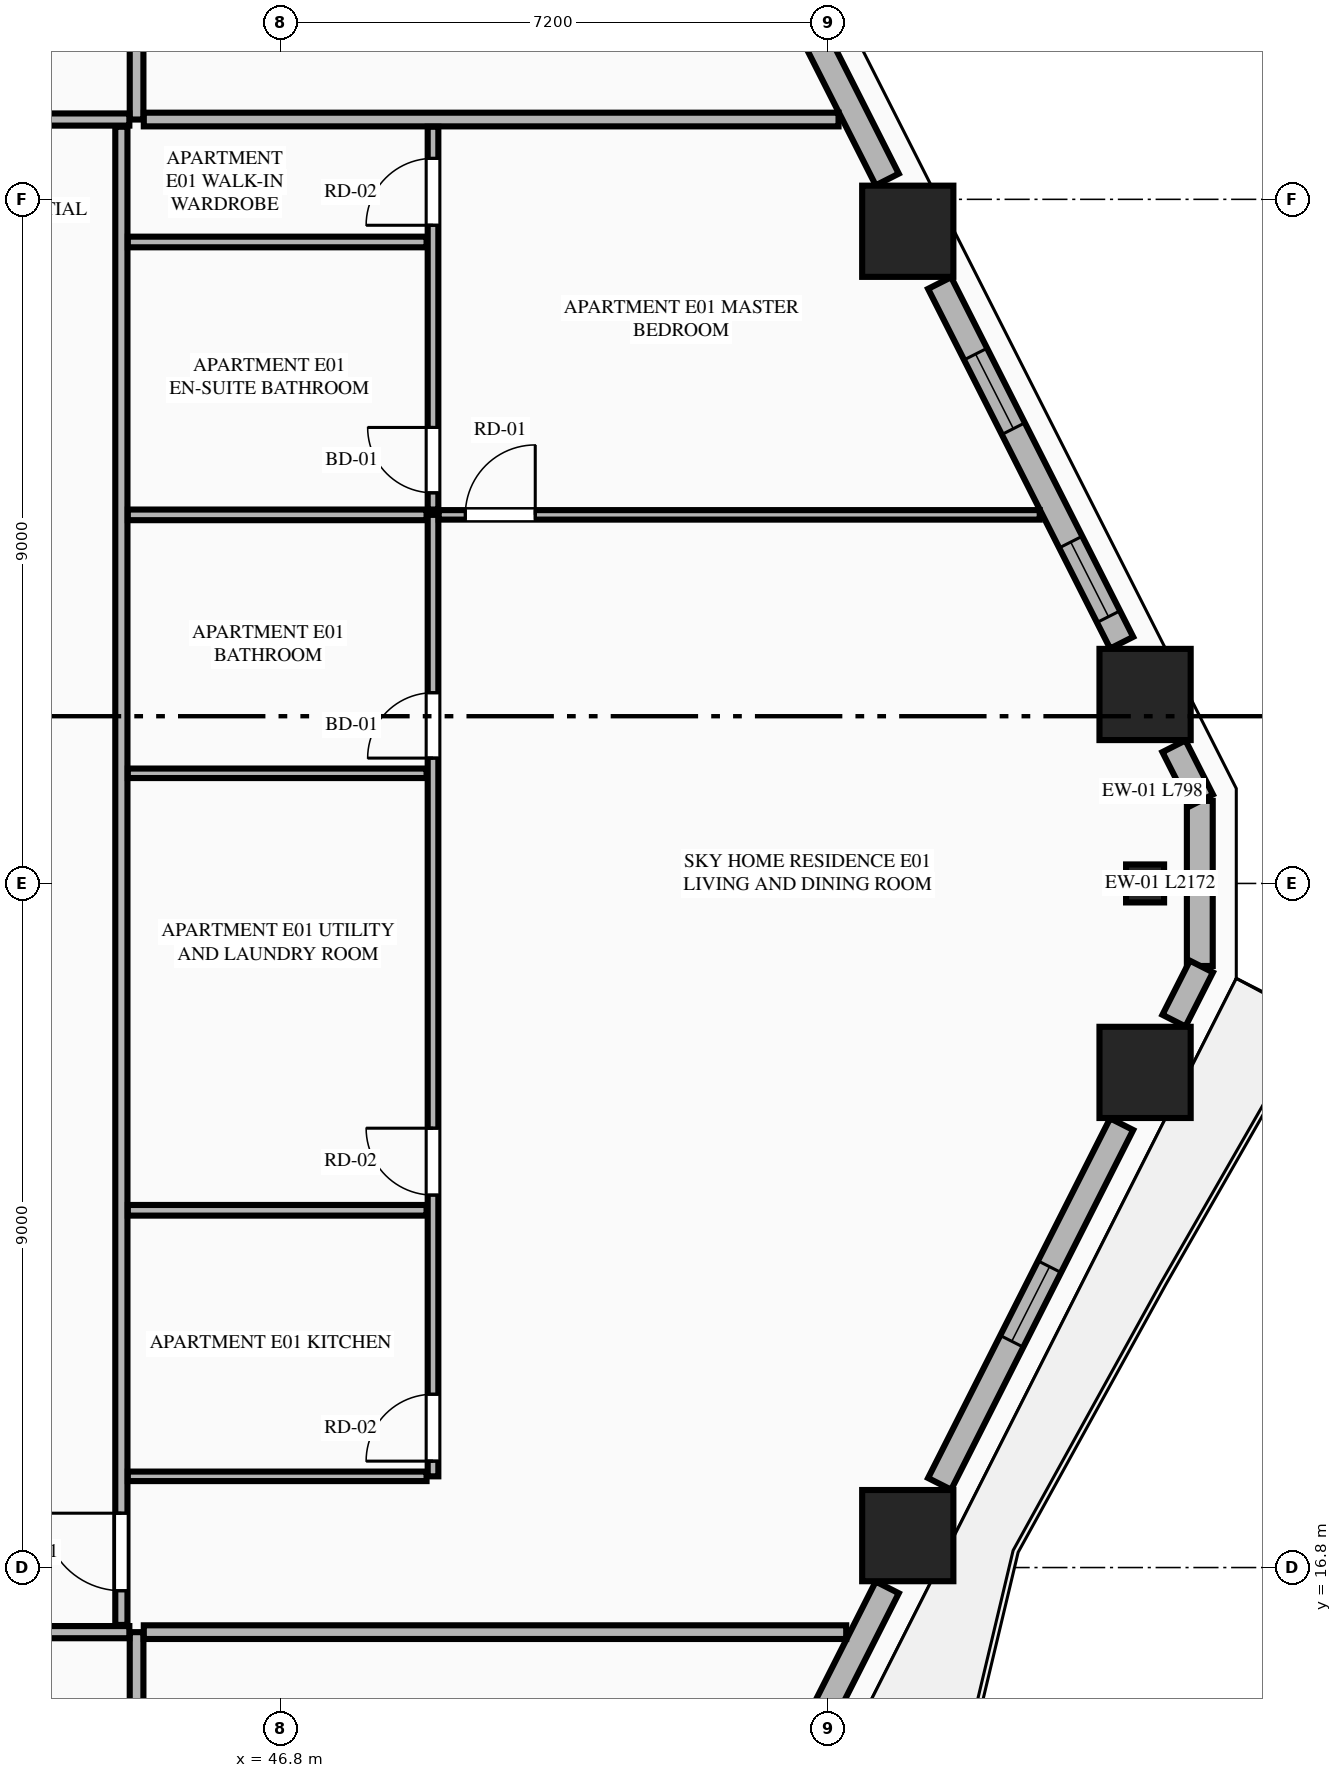
"""IFC4 building model, lengths in metres.
Left out: names, types, materials, properties, quantities, classifications, styles, units other than length and angle.
Written with IfcOpenShell. Run it as: python <this file> out.ifc"""

import sys

from ifc_helpers import new_model, si_unit, direction, frame, frame_2d, origin, origin_2d, place, context, subcontext, project, spatial, rectangle, extrude, element, fill, save


model = new_model("IFC4")
c1 = context("Model", 3, precision=1e-05, world=origin(), true_north=direction((0.0, 1.0)))
c2 = subcontext(c1, "Body", "Model", "MODEL_VIEW")
j1 = project(units=[si_unit("LENGTHUNIT", "METRE"), si_unit("PLANEANGLEUNIT", "RADIAN")], contexts=[c1])
p1 = place(None, origin())
s1 = spatial("IfcSite", under=j1, at=p1, CompositionType="ELEMENT")
p2 = place(p1, origin())
s2 = spatial("IfcBuilding", under=s1, at=p2, CompositionType="ELEMENT")
p3 = place(p2, frame((0.0, 0.0, 53.3)))
s3 = spatial("IfcBuildingStorey", under=s2, at=p3, CompositionType="ELEMENT", Elevation=53.3)
for number, where, z_axis, x_axis in (
    (1, (55.046, 17.22, 0.0), (0.0, 0.0, 1.0), (1.0, 0.0, 0.0)),
    (2, (58.168, 23.314, 0.0), (0.0, 0.0, 1.0), (1.0, 0.0, 0.0)),
    (3, (58.168, 28.286, 0.0), (0.0, 0.0, 1.0), (1.0, 0.0, 0.0)),
    (4, (55.046, 34.38, 0.0), (0.0, 0.0, 1.0), (1.0, 0.0, 0.0)),
):
    element("IfcColumn", number, at=place(p3, frame(where, z_axis=z_axis, x_axis=x_axis)), inside=s3, PredefinedType="COLUMN", context=c2, shape_type="SweptSolid", body=[
        extrude(rectangle(XDim=1.2, YDim=1.2, at=origin_2d()), origin(), (0.0, 0.0, 1.0), 3.55),
    ])
p4 = place(p3, frame((58.168, 25.8, 0.0), z_axis=(0.0, 0.0, 1.0), x_axis=(0.0, 1.0, 0.0)))
e5 = element("IfcColumn", 5, at=p4, inside=s3, PredefinedType="PILASTER", context=c2, shape_type="SweptSolid", body=[
    extrude(rectangle(XDim=0.5, YDim=0.35, at=origin_2d()), origin(), (0.0, 0.0, 1.0), 3.55),
])
p5 = place(p3, frame((58.888, 24.714, 0.0), z_axis=(0.0, 0.0, 1.0), x_axis=(0.0, 1.0, 0.0)))
e6 = element("IfcWall", 6, at=p5, inside=s3, PredefinedType="STANDARD", context=c2, shape_type="SweptSolid", body=[
    extrude(rectangle(XDim=2.172, YDim=0.34, at=frame_2d((1.086, 0.0))), origin(), (0.0, 0.0, 1.0), 3.33),
])
p6 = place(p3, frame((52.271, 11.59, 0.0), z_axis=(0.0, 0.0, 1.0), x_axis=(0.451592100298, 0.892224509273, 0.0)))
e7 = element("IfcWall", 7, at=p6, inside=s3, PredefinedType="STANDARD", context=c2, shape_type="SweptSolid", body=[
    extrude(rectangle(XDim=5.547, YDim=0.34, at=frame_2d((2.773, 0.0))), origin(), (0.0, 0.0, 1.0), 2.787),
])
p7 = place(p6, frame((1.768, 0.0, 0.0)))
e8 = element("IfcOpeningElement", 8, at=p7, cuts=e7, PredefinedType="OPENING", context=c2, shape_type="SweptSolid", body=[
    extrude(rectangle(XDim=1.1, YDim=2.25, at=frame_2d((0.55, 1.125))), frame((0.0, 0.18, 0.0), z_axis=(0.0, -1.0, 0.0), x_axis=(1.0, 0.0, 0.0)), (0.0, 0.0, 1.0), 0.36),
])
p8 = place(p3, frame((55.465, 17.901, 0.0), z_axis=(0.0, 0.0, 1.0), x_axis=(0.451572088722, 0.892234637686, 0.0)))
e9 = element("IfcWall", 9, at=p8, inside=s3, PredefinedType="STANDARD", context=c2, shape_type="SweptSolid", body=[
    extrude(rectangle(XDim=5.304, YDim=0.34, at=frame_2d((2.652, 0.0))), origin(), (0.0, 0.0, 1.0), 2.787),
])
p9 = place(p8, frame((2.102, 0.0, 0.75)))
e10 = element("IfcOpeningElement", 10, at=p9, cuts=e9, PredefinedType="OPENING", context=c2, shape_type="SweptSolid", body=[
    extrude(rectangle(XDim=1.1, YDim=1.887, at=frame_2d((0.55, 0.943))), frame((0.0, 0.18, 0.0), z_axis=(0.0, -1.0, 0.0), x_axis=(1.0, 0.0, 0.0)), (0.0, 0.0, 1.0), 0.36),
])
for number, where, z_axis, x_axis in (
    (11, (58.548, 23.995, 0.0), (0.0, 0.0, 1.0), (0.452, 0.892, 0.0)),
    (12, (58.909, 26.893, 0.0), (0.0, 0.0, 1.0), (-0.452, 0.892, 0.0)),
):
    element("IfcWall", number, at=place(p3, frame(where, z_axis=z_axis, x_axis=x_axis)), inside=s3, PredefinedType="STANDARD", context=c2, shape_type="SweptSolid", body=[
        extrude(rectangle(XDim=0.798, YDim=0.34, at=frame_2d((0.399, 0.0))), origin(), (0.0, 0.0, 1.0), 3.33),
    ])
p10 = place(p3, frame((57.86, 28.967, 0.0), z_axis=(0.0, 0.0, 1.0), x_axis=(-0.451590635984, 0.892225250422, 0.0)))
e13 = element("IfcWall", 13, at=p10, inside=s3, PredefinedType="STANDARD", context=c2, shape_type="SweptSolid", body=[
    extrude(rectangle(XDim=5.303, YDim=0.34, at=frame_2d((2.652, 0.0))), origin(), (0.0, 0.0, 1.0), 2.787),
])
p11 = place(p10, frame((0.384, 0.0, 0.75)))
e14 = element("IfcOpeningElement", 14, at=p11, cuts=e13, PredefinedType="OPENING", context=c2, shape_type="SweptSolid", body=[
    extrude(rectangle(XDim=1.1, YDim=1.887, at=frame_2d((0.55, 0.943))), frame((0.0, 0.18, 0.0), z_axis=(0.0, -1.0, 0.0), x_axis=(1.0, 0.0, 0.0)), (0.0, 0.0, 1.0), 0.36),
])
p12 = place(p10, frame((3.156, 0.0, 0.75)))
e15 = element("IfcOpeningElement", 15, at=p12, cuts=e13, PredefinedType="OPENING", context=c2, shape_type="SweptSolid", body=[
    extrude(rectangle(XDim=1.1, YDim=1.887, at=frame_2d((0.55, 0.943))), frame((0.0, 0.18, 0.0), z_axis=(0.0, -1.0, 0.0), x_axis=(1.0, 0.0, 0.0)), (0.0, 0.0, 1.0), 0.36),
])
p13 = place(p3, frame((54.776, 35.061, 0.0), z_axis=(0.0, 0.0, 1.0), x_axis=(-0.451592100298, 0.892224509273, 0.0)))
e16 = element("IfcWall", 16, at=p13, inside=s3, PredefinedType="STANDARD", context=c2, shape_type="SweptSolid", body=[
    extrude(rectangle(XDim=5.547, YDim=0.34, at=frame_2d((2.773, 0.0))), origin(), (0.0, 0.0, 1.0), 2.787),
])
p14 = place(p13, frame((2.223, 0.0, 0.75)))
e17 = element("IfcOpeningElement", 17, at=p14, cuts=e16, PredefinedType="OPENING", context=c2, shape_type="SweptSolid", body=[
    extrude(rectangle(XDim=1.1, YDim=1.887, at=frame_2d((0.55, 0.943))), frame((0.0, 0.18, 0.0), z_axis=(0.0, -1.0, 0.0), x_axis=(1.0, 0.0, 0.0)), (0.0, 0.0, 1.0), 0.36),
])
p15 = place(p3, frame((44.9, 2.455, 0.0), z_axis=(0.0, 0.0, 1.0), x_axis=(0.0, 1.0, 0.0)))
e18 = element("IfcWall", 18, at=p15, inside=s3, PredefinedType="PARTITIONING", context=c2, shape_type="SweptSolid", body=[
    extrude(rectangle(XDim=13.495, YDim=0.18, at=frame_2d((6.748, 0.0))), origin(), (0.0, 0.0, 1.0), 3.33),
])
p16 = place(p3, frame((36.617, 15.95, 0.0), z_axis=(0.0, 0.0, 1.0), x_axis=(1.0, 0.0, 0.0)))
e19 = element("IfcWall", 19, at=p16, inside=s3, PredefinedType="PARTITIONING", context=c2, shape_type="SweptSolid", body=[
    extrude(rectangle(XDim=8.188, YDim=0.16, at=frame_2d((4.094, 0.0))), origin(), (0.0, 0.0, 1.0), 3.33),
])
p17 = place(p16, frame((0.355, 0.0, 0.0)))
e20 = element("IfcOpeningElement", 20, at=p17, cuts=e19, PredefinedType="OPENING", context=c2, shape_type="SweptSolid", body=[
    extrude(rectangle(XDim=1.02, YDim=2.25, at=frame_2d((0.51, 1.125))), frame((0.0, 0.09, 0.0), z_axis=(0.0, -1.0, 0.0), x_axis=(1.0, 0.0, 0.0)), (0.0, 0.0, 1.0), 0.18),
])
p18 = place(p3, frame((44.9, 35.85, 0.0), z_axis=(0.0, 0.0, 1.0), x_axis=(0.0, 1.0, 0.0)))
e21 = element("IfcWall", 21, at=p18, inside=s3, PredefinedType="PARTITIONING", context=c2, shape_type="SweptSolid", body=[
    extrude(rectangle(XDim=13.295, YDim=0.18, at=frame_2d((6.647, 0.0))), origin(), (0.0, 0.0, 1.0), 3.33),
])
p19 = place(p3, frame((36.617, 35.85, 0.0), z_axis=(0.0, 0.0, 1.0), x_axis=(1.0, 0.0, 0.0)))
e22 = element("IfcWall", 22, at=p19, inside=s3, PredefinedType="PARTITIONING", context=c2, shape_type="SweptSolid", body=[
    extrude(rectangle(XDim=8.188, YDim=0.16, at=frame_2d((4.094, 0.0))), origin(), (0.0, 0.0, 1.0), 3.33),
])
p20 = place(p19, frame((0.355, 0.0, 0.0)))
e23 = element("IfcOpeningElement", 23, at=p20, cuts=e22, PredefinedType="OPENING", context=c2, shape_type="SweptSolid", body=[
    extrude(rectangle(XDim=1.02, YDim=2.25, at=frame_2d((0.51, 1.125))), frame((0.0, 0.09, 0.0), z_axis=(0.0, -1.0, 0.0), x_axis=(1.0, 0.0, 0.0)), (0.0, 0.0, 1.0), 0.18),
])
p21 = place(p3, frame((44.995, 15.95, 0.0), z_axis=(0.0, 0.0, 1.0), x_axis=(1.0, 0.0, 0.0)))
e24 = element("IfcWall", 24, at=p21, inside=s3, PredefinedType="PARTITIONING", context=c2, shape_type="SweptSolid", body=[
    extrude(rectangle(XDim=9.241, YDim=0.18, at=frame_2d((4.621, 0.0))), origin(), (0.0, 0.0, 1.0), 3.33),
])
p22 = place(p3, frame((44.995, 35.85, 0.0), z_axis=(0.0, 0.0, 1.0), x_axis=(1.0, 0.0, 0.0)))
e25 = element("IfcWall", 25, at=p22, inside=s3, PredefinedType="PARTITIONING", context=c2, shape_type="SweptSolid", body=[
    extrude(rectangle(XDim=9.14, YDim=0.18, at=frame_2d((4.57, 0.0))), origin(), (0.0, 0.0, 1.0), 3.33),
])
p23 = place(p3, frame((44.7, 16.045, 0.0), z_axis=(0.0, 0.0, 1.0), x_axis=(0.0, 1.0, 0.0)))
e26 = element("IfcWall", 26, at=p23, inside=s3, PredefinedType="PARTITIONING", context=c2, shape_type="SweptSolid", body=[
    extrude(rectangle(XDim=19.71, YDim=0.16, at=frame_2d((9.855, 0.0))), origin(), (0.0, 0.0, 1.0), 3.33),
])
p24 = place(p23, frame((0.45, 0.0, 0.0)))
e27 = element("IfcOpeningElement", 27, at=p24, cuts=e26, PredefinedType="OPENING", context=c2, shape_type="SweptSolid", body=[
    extrude(rectangle(XDim=1.02, YDim=2.25, at=frame_2d((0.51, 1.125))), frame((0.0, 0.09, 0.0), z_axis=(0.0, -1.0, 0.0), x_axis=(1.0, 0.0, 0.0)), (0.0, 0.0, 1.0), 0.18),
])
p25 = place(p3, frame((44.785, 18.0, 0.0), z_axis=(0.0, 0.0, 1.0), x_axis=(1.0, 0.0, 0.0)))
e28 = element("IfcWall", 28, at=p25, inside=s3, PredefinedType="PARTITIONING", context=c2, shape_type="SweptSolid", body=[
    extrude(rectangle(XDim=3.93, YDim=0.125, at=frame_2d((1.965, 0.0))), origin(), (0.0, 0.0, 1.0), 2.637),
])
p26 = place(p3, frame((48.8, 18.0, 0.0), z_axis=(0.0, 0.0, 1.0), x_axis=(0.0, 1.0, 0.0)))
e29 = element("IfcWall", 29, at=p26, inside=s3, PredefinedType="PLUMBINGWALL", context=c2, shape_type="SweptSolid", body=[
    extrude(rectangle(XDim=12.649, YDim=0.14, at=frame_2d((6.324, 0.0))), origin(), (0.0, 0.0, 1.0), 3.33),
])
p27 = place(p26, frame((0.2, 0.0, 0.0)))
e30 = element("IfcOpeningElement", 30, at=p27, cuts=e29, PredefinedType="OPENING", context=c2, shape_type="SweptSolid", body=[
    extrude(rectangle(XDim=0.88, YDim=2.15, at=frame_2d((0.44, 1.075))), frame((0.0, 0.08, 0.0), z_axis=(0.0, -1.0, 0.0), x_axis=(1.0, 0.0, 0.0)), (0.0, 0.0, 1.0), 0.16),
])
p28 = place(p26, frame((3.7, 0.0, 0.0)))
e31 = element("IfcOpeningElement", 31, at=p28, cuts=e29, PredefinedType="OPENING", context=c2, shape_type="SweptSolid", body=[
    extrude(rectangle(XDim=0.88, YDim=2.15, at=frame_2d((0.44, 1.075))), frame((0.0, 0.08, 0.0), z_axis=(0.0, -1.0, 0.0), x_axis=(1.0, 0.0, 0.0)), (0.0, 0.0, 1.0), 0.16),
])
p29 = place(p26, frame((9.449, 0.0, 0.0)))
e32 = element("IfcOpeningElement", 32, at=p29, cuts=e29, PredefinedType="OPENING", context=c2, shape_type="SweptSolid", body=[
    extrude(rectangle(XDim=0.86, YDim=2.1, at=frame_2d((0.43, 1.05))), frame((0.0, 0.08, 0.0), z_axis=(0.0, -1.0, 0.0), x_axis=(1.0, 0.0, 0.0)), (0.0, 0.0, 1.0), 0.16),
])
p30 = place(p3, frame((48.8, 30.719, 0.0), z_axis=(0.0, 0.0, 1.0), x_axis=(0.0, 1.0, 0.0)))
e33 = element("IfcWall", 33, at=p30, inside=s3, PredefinedType="PLUMBINGWALL", context=c2, shape_type="SweptSolid", body=[
    extrude(rectangle(XDim=5.036, YDim=0.14, at=frame_2d((2.518, 0.0))), origin(), (0.0, 0.0, 1.0), 3.33),
])
p31 = place(p30, frame((0.22, 0.0, 0.0)))
e34 = element("IfcOpeningElement", 34, at=p31, cuts=e33, PredefinedType="OPENING", context=c2, shape_type="SweptSolid", body=[
    extrude(rectangle(XDim=0.86, YDim=2.1, at=frame_2d((0.43, 1.05))), frame((0.0, 0.08, 0.0), z_axis=(0.0, -1.0, 0.0), x_axis=(1.0, 0.0, 0.0)), (0.0, 0.0, 1.0), 0.16),
])
p32 = place(p30, frame((3.74, 0.0, 0.0)))
e35 = element("IfcOpeningElement", 35, at=p32, cuts=e33, PredefinedType="OPENING", context=c2, shape_type="SweptSolid", body=[
    extrude(rectangle(XDim=0.88, YDim=2.15, at=frame_2d((0.44, 1.075))), frame((0.0, 0.08, 0.0), z_axis=(0.0, -1.0, 0.0), x_axis=(1.0, 0.0, 0.0)), (0.0, 0.0, 1.0), 0.16),
])
p33 = place(p3, frame((44.785, 30.649, 0.0), z_axis=(0.0, 0.0, 1.0), x_axis=(1.0, 0.0, 0.0)))
e36 = element("IfcWall", 36, at=p33, inside=s3, PredefinedType="PLUMBINGWALL", context=c2, shape_type="SweptSolid", body=[
    extrude(rectangle(XDim=3.93, YDim=0.14, at=frame_2d((1.965, 0.0))), origin(), (0.0, 0.0, 1.0), 3.33),
])
p34 = place(p3, frame((48.875, 30.649, 0.0), z_axis=(0.0, 0.0, 1.0), x_axis=(1.0, 0.0, 0.0)))
e37 = element("IfcWall", 37, at=p34, inside=s3, PredefinedType="PARTITIONING", context=c2, shape_type="SweptSolid", body=[
    extrude(rectangle(XDim=7.907, YDim=0.125, at=frame_2d((3.954, 0.0))), origin(), (0.0, 0.0, 1.0), 3.33),
])
p35 = place(p34, frame((0.35, 0.0, 0.0)))
e38 = element("IfcOpeningElement", 38, at=p35, cuts=e37, PredefinedType="OPENING", context=c2, shape_type="SweptSolid", body=[
    extrude(rectangle(XDim=0.92, YDim=2.15, at=frame_2d((0.46, 1.075))), frame((0.0, 0.073, 0.0), z_axis=(0.0, -1.0, 0.0), x_axis=(1.0, 0.0, 0.0)), (0.0, 0.0, 1.0), 0.145),
])
p36 = place(p3, frame((44.785, 21.5, 0.0), z_axis=(0.0, 0.0, 1.0), x_axis=(1.0, 0.0, 0.0)))
e39 = element("IfcWall", 39, at=p36, inside=s3, PredefinedType="PLUMBINGWALL", context=c2, shape_type="SweptSolid", body=[
    extrude(rectangle(XDim=3.93, YDim=0.14, at=frame_2d((1.965, 0.0))), origin(), (0.0, 0.0, 1.0), 3.33),
])
p37 = place(p3, frame((44.785, 27.249, 0.0), z_axis=(0.0, 0.0, 1.0), x_axis=(1.0, 0.0, 0.0)))
e40 = element("IfcWall", 40, at=p37, inside=s3, PredefinedType="PARTITIONING", context=c2, shape_type="SweptSolid", body=[
    extrude(rectangle(XDim=3.93, YDim=0.125, at=frame_2d((1.965, 0.0))), origin(), (0.0, 0.0, 1.0), 3.33),
])
p38 = place(p3, frame((44.785, 34.239, 0.0), z_axis=(0.0, 0.0, 1.0), x_axis=(1.0, 0.0, 0.0)))
e41 = element("IfcWall", 41, at=p38, inside=s3, PredefinedType="PLUMBINGWALL", context=c2, shape_type="SweptSolid", body=[
    extrude(rectangle(XDim=3.93, YDim=0.14, at=frame_2d((1.965, 0.0))), origin(), (0.0, 0.0, 1.0), 2.637),
])
p39 = place(p9, origin())
e42 = element("IfcWindow", 42, at=p39, inside=s3, PartitioningType="SINGLE_PANEL", PredefinedType="WINDOW", context=c2, shape_type="SweptSolid", body=[
    extrude(rectangle(XDim=1.1, YDim=1.887, at=frame_2d((0.55, 0.943))), frame((0.0, 0.03, 0.0), z_axis=(0.0, -1.0, 0.0), x_axis=(1.0, 0.0, 0.0)), (0.0, 0.0, 1.0), 0.06),
])
fill(e10, e42)
p40 = place(p11, origin())
e43 = element("IfcWindow", 43, at=p40, inside=s3, PartitioningType="SINGLE_PANEL", PredefinedType="WINDOW", context=c2, shape_type="SweptSolid", body=[
    extrude(rectangle(XDim=1.1, YDim=1.887, at=frame_2d((0.55, 0.943))), frame((0.0, 0.03, 0.0), z_axis=(0.0, -1.0, 0.0), x_axis=(1.0, 0.0, 0.0)), (0.0, 0.0, 1.0), 0.06),
])
fill(e14, e43)
p41 = place(p27, origin())
e44 = element("IfcDoor", 44, at=p41, inside=s3, OperationType="SINGLE_SWING_LEFT", PredefinedType="DOOR", context=c2, shape_type="SweptSolid", body=[
    extrude(rectangle(XDim=0.88, YDim=2.15, at=frame_2d((0.44, 1.075))), frame((0.0, 0.025, 0.0), z_axis=(0.0, -1.0, 0.0), x_axis=(1.0, 0.0, 0.0)), (0.0, 0.0, 1.0), 0.05),
])
fill(e30, e44)
p42 = place(p28, origin())
e45 = element("IfcDoor", 45, at=p42, inside=s3, OperationType="SINGLE_SWING_RIGHT", PredefinedType="DOOR", context=c2, shape_type="SweptSolid", body=[
    extrude(rectangle(XDim=0.88, YDim=2.15, at=frame_2d((0.44, 1.075))), frame((0.0, 0.025, 0.0), z_axis=(0.0, -1.0, 0.0), x_axis=(1.0, 0.0, 0.0)), (0.0, 0.0, 1.0), 0.05),
])
fill(e31, e45)
p43 = place(p29, origin())
e46 = element("IfcDoor", 46, at=p43, inside=s3, OperationType="SINGLE_SWING_LEFT", PredefinedType="DOOR", context=c2, shape_type="SweptSolid", body=[
    extrude(rectangle(XDim=0.86, YDim=2.1, at=frame_2d((0.43, 1.05))), frame((0.0, 0.025, 0.0), z_axis=(0.0, -1.0, 0.0), x_axis=(1.0, 0.0, 0.0)), (0.0, 0.0, 1.0), 0.05),
])
fill(e32, e46)
p44 = place(p31, origin())
e47 = element("IfcDoor", 47, at=p44, inside=s3, OperationType="SINGLE_SWING_RIGHT", PredefinedType="DOOR", context=c2, shape_type="SweptSolid", body=[
    extrude(rectangle(XDim=0.86, YDim=2.1, at=frame_2d((0.43, 1.05))), frame((0.0, 0.025, 0.0), z_axis=(0.0, -1.0, 0.0), x_axis=(1.0, 0.0, 0.0)), (0.0, 0.0, 1.0), 0.05),
])
fill(e34, e47)
p45 = place(p32, origin())
e48 = element("IfcDoor", 48, at=p45, inside=s3, OperationType="SINGLE_SWING_LEFT", PredefinedType="DOOR", context=c2, shape_type="SweptSolid", body=[
    extrude(rectangle(XDim=0.88, YDim=2.15, at=frame_2d((0.44, 1.075))), frame((0.0, 0.025, 0.0), z_axis=(0.0, -1.0, 0.0), x_axis=(1.0, 0.0, 0.0)), (0.0, 0.0, 1.0), 0.05),
])
fill(e35, e48)
p46 = place(p24, origin())
e49 = element("IfcDoor", 49, at=p46, inside=s3, OperationType="SINGLE_SWING_RIGHT", PredefinedType="DOOR", context=c2, shape_type="SweptSolid", body=[
    extrude(rectangle(XDim=1.02, YDim=2.25, at=frame_2d((0.51, 1.125))), frame((0.0, 0.025, 0.0), z_axis=(0.0, -1.0, 0.0), x_axis=(1.0, 0.0, 0.0)), (0.0, 0.0, 1.0), 0.05),
])
fill(e27, e49)
p47 = place(p35, origin())
e50 = element("IfcDoor", 50, at=p47, inside=s3, OperationType="SINGLE_SWING_RIGHT", PredefinedType="DOOR", context=c2, shape_type="SweptSolid", body=[
    extrude(rectangle(XDim=0.92, YDim=2.15, at=frame_2d((0.46, 1.075))), frame((0.0, 0.025, 0.0), z_axis=(0.0, -1.0, 0.0), x_axis=(1.0, 0.0, 0.0)), (0.0, 0.0, 1.0), 0.05),
])
fill(e38, e50)
p48 = place(p12, origin())
e51 = element("IfcWindow", 51, at=p48, inside=s3, PartitioningType="SINGLE_PANEL", PredefinedType="WINDOW", context=c2, shape_type="SweptSolid", body=[
    extrude(rectangle(XDim=1.1, YDim=1.887, at=frame_2d((0.55, 0.943))), frame((0.0, 0.03, 0.0), z_axis=(0.0, -1.0, 0.0), x_axis=(1.0, 0.0, 0.0)), (0.0, 0.0, 1.0), 0.06),
])
fill(e15, e51)
save(model, sys.argv[1])
